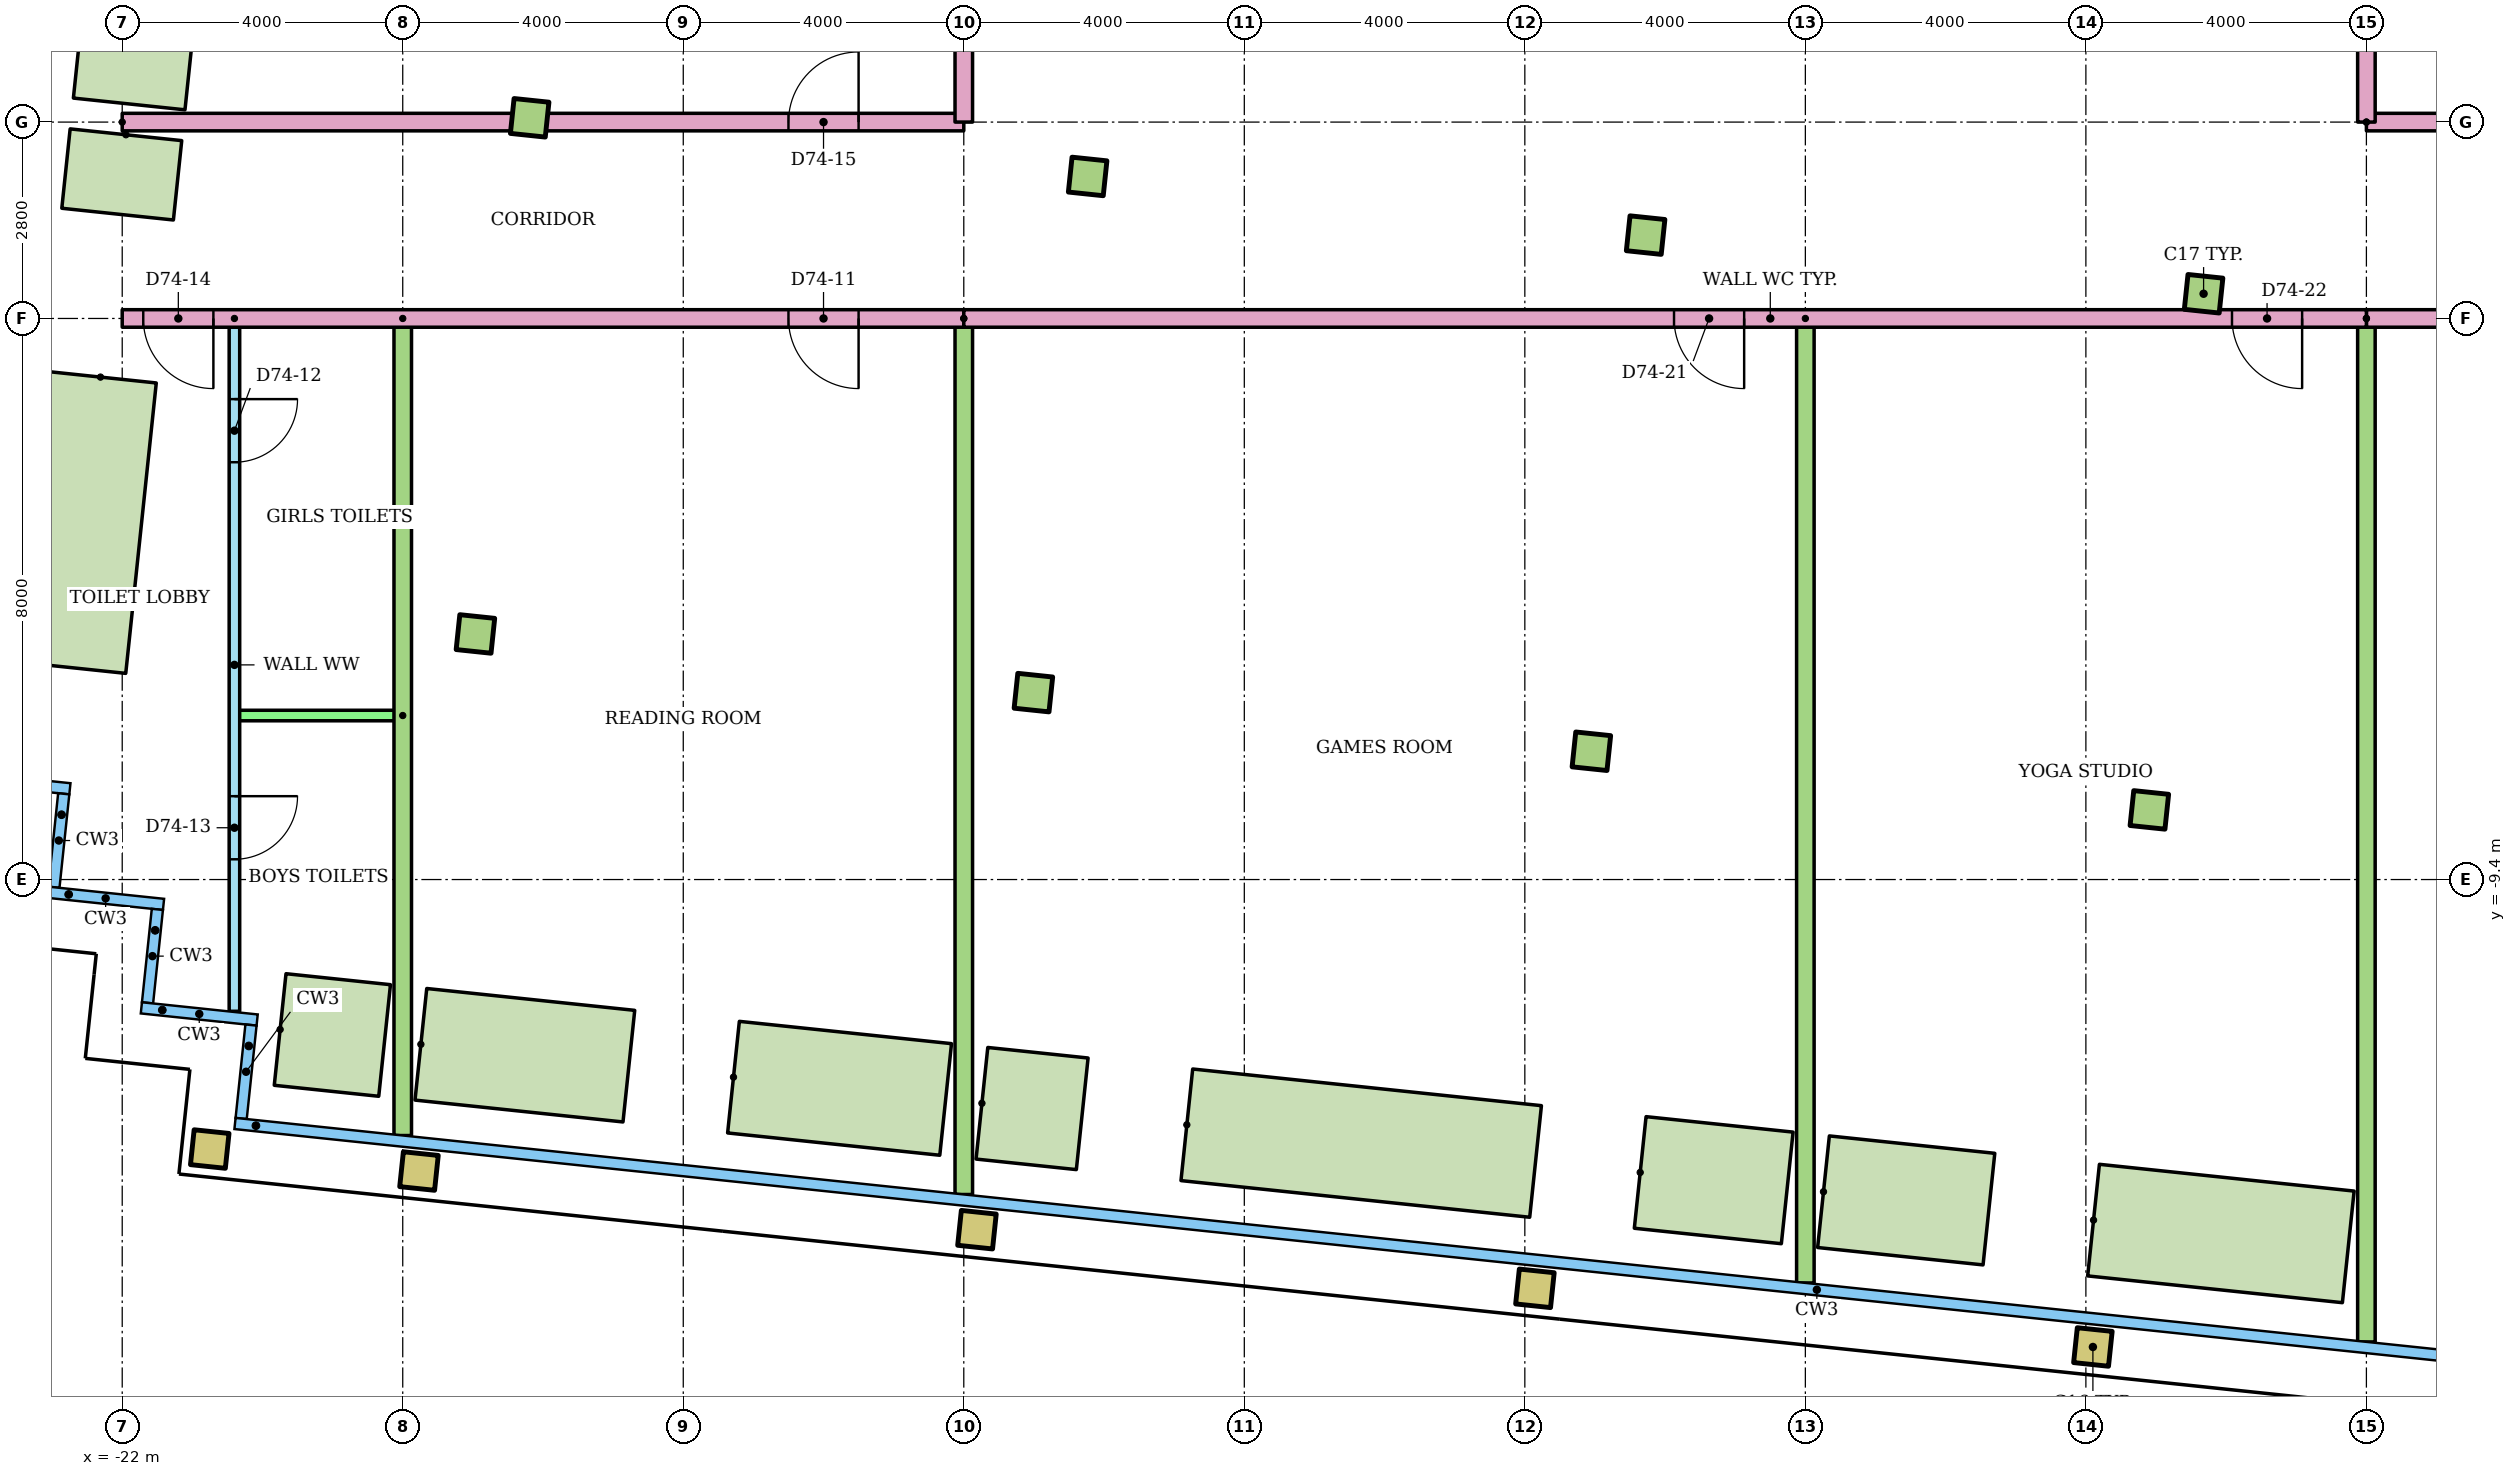
"""IFC4 building model, lengths in metres.
Left out: names, types, materials, properties, quantities, classifications, styles, units other than length and angle.
Written with IfcOpenShell. Run it as: python <this file> out.ifc"""

import sys

from ifc_helpers import new_model, si_unit, direction, frame, frame_2d, origin, origin_2d, place, context, subcontext, project, spatial, rectangle, hollow_rectangle, extrude, element, fill, save


model = new_model("IFC4")
c1 = context("Model", 3, precision=1e-05, world=origin(), true_north=direction((0.0, 1.0)))
c2 = subcontext(c1, "Body", "Model", "MODEL_VIEW")
j1 = project(units=[si_unit("LENGTHUNIT", "METRE"), si_unit("PLANEANGLEUNIT", "RADIAN")], contexts=[c1])
p1 = place(None, origin())
s1 = spatial("IfcSite", under=j1, at=p1, CompositionType="ELEMENT")
p2 = place(p1, origin())
s2 = spatial("IfcBuilding", under=s1, at=p2, CompositionType="ELEMENT")
p3 = place(p2, frame((0.0, 0.0, 281.9)))
s3 = spatial("IfcBuildingStorey", under=s2, at=p3, CompositionType="ELEMENT", Elevation=281.9)
for number, where, z_axis, x_axis in (
    (1, (-20.752, -13.243, 0.0), (0.0, 0.0, 1.0), (0.995, -0.105, 0.0)),
    (2, (-17.768, -13.556, 0.0), (0.0, 0.0, 1.0), (0.995, -0.105, 0.0)),
    (3, (-9.812, -14.392, 0.0), (0.0, 0.0, 1.0), (0.995, -0.105, 0.0)),
    (4, (-1.856, -15.229, 0.0), (0.0, 0.0, 1.0), (0.995, -0.105, 0.0)),
    (5, (6.1, -16.065, 0.0), (0.0, 0.0, 1.0), (0.995, -0.105, 0.0)),
):
    element("IfcColumn", number, at=place(p3, frame(where, z_axis=z_axis, x_axis=x_axis)), inside=s3, PredefinedType="COLUMN", context=c2, shape_type="SweptSolid", body=[
        extrude(hollow_rectangle(XDim=0.5, YDim=0.5, WallThickness=0.025, at=origin_2d()), origin(), (0.0, 0.0, 1.0), 9.6),
    ])
for number, where, z_axis, x_axis in (
    (6, (-16.964, -5.898, 0.0), (0.0, 0.0, 1.0), (0.995, -0.105, 0.0)),
    (7, (-9.007, -6.735, 0.0), (0.0, 0.0, 1.0), (0.995, -0.105, 0.0)),
    (8, (-1.051, -7.571, 0.0), (0.0, 0.0, 1.0), (0.995, -0.105, 0.0)),
    (9, (6.905, -8.407, 0.0), (0.0, 0.0, 1.0), (0.995, -0.105, 0.0)),
    (10, (-16.19, 1.461, 0.0), (0.0, 0.0, 1.0), (0.995, -0.105, 0.0)),
    (11, (-8.234, 0.625, 0.0), (0.0, 0.0, 1.0), (0.995, -0.105, 0.0)),
    (12, (-0.278, -0.211, 0.0), (0.0, 0.0, 1.0), (0.995, -0.105, 0.0)),
    (13, (7.678, -1.048, 0.0), (0.0, 0.0, 1.0), (0.995, -0.105, 0.0)),
):
    element("IfcColumn", number, at=place(p3, frame(where, z_axis=z_axis, x_axis=x_axis)), inside=s3, PredefinedType="COLUMN", context=c2, shape_type="SweptSolid", body=[
        extrude(rectangle(XDim=0.5, YDim=0.5, at=origin_2d()), origin(), (0.0, 0.0, 1.0), 9.6),
    ])
p4 = place(p3, frame((-6.82, -12.897, 0.0), z_axis=(0.0, 0.0, 1.0), x_axis=(0.994520692635, -0.104539905878, 0.0)))
e14 = element("IfcWall", 14, at=p4, inside=s3, PredefinedType="STANDARD", context=c2, shape_type="SweptSolid", body=[
    extrude(rectangle(XDim=5.0, YDim=1.6, at=frame_2d((2.5, 0.0))), origin(), (0.0, 0.0, 1.0), 0.8),
])
p5 = place(p3, frame((-10.0, -1.4, 0.0), z_axis=(0.0, 0.0, 1.0), x_axis=(-1.0, 0.0, 0.0)))
e15 = element("IfcWall", 15, at=p5, inside=s3, PredefinedType="PARTITIONING", context=c2, shape_type="SweptSolid", body=[
    extrude(rectangle(XDim=12.0, YDim=0.25, at=frame_2d((6.0, 0.0))), origin(), (0.0, 0.0, 1.0), 8.8),
])
p6 = place(p5, frame((1.5, 0.0, 0.0)))
e16 = element("IfcOpeningElement", 16, at=p6, cuts=e15, PredefinedType="OPENING", context=c2, shape_type="SweptSolid", body=[
    extrude(rectangle(XDim=1.0, YDim=2.1, at=frame_2d((0.5, 1.05))), frame((0.0, 0.135, 0.0), z_axis=(0.0, -1.0, 0.0), x_axis=(1.0, 0.0, 0.0)), (0.0, 0.0, 1.0), 0.27),
])
p7 = place(p5, frame((10.7, 0.0, 0.0)))
e17 = element("IfcOpeningElement", 17, at=p7, cuts=e15, PredefinedType="OPENING", context=c2, shape_type="SweptSolid", body=[
    extrude(rectangle(XDim=1.0, YDim=2.1, at=frame_2d((0.5, 1.05))), frame((0.0, 0.135, 0.0), z_axis=(0.0, -1.0, 0.0), x_axis=(1.0, 0.0, 0.0)), (0.0, 0.0, 1.0), 0.27),
])
p8 = place(p3, frame((-20.4, -1.4, 0.0), z_axis=(0.0, 0.0, 1.0), x_axis=(0.0, -1.0, 0.0)))
e18 = element("IfcWall", 18, at=p8, inside=s3, PredefinedType="PARTITIONING", context=c2, shape_type="SweptSolid", body=[
    extrude(rectangle(XDim=9.879, YDim=0.15, at=frame_2d((4.939, 0.0))), origin(), (0.0, 0.0, 1.0), 8.8),
])
p9 = place(p8, frame((1.15, 0.0, 0.0)))
e19 = element("IfcOpeningElement", 19, at=p9, cuts=e18, PredefinedType="OPENING", context=c2, shape_type="SweptSolid", body=[
    extrude(rectangle(XDim=0.9, YDim=2.1, at=frame_2d((0.45, 1.05))), frame((0.0, 0.085, 0.0), z_axis=(0.0, -1.0, 0.0), x_axis=(1.0, 0.0, 0.0)), (0.0, 0.0, 1.0), 0.17),
])
p10 = place(p8, frame((6.811, 0.0, 0.0)))
e20 = element("IfcOpeningElement", 20, at=p10, cuts=e18, PredefinedType="OPENING", context=c2, shape_type="SweptSolid", body=[
    extrude(rectangle(XDim=0.9, YDim=2.1, at=frame_2d((0.45, 1.05))), frame((0.0, 0.085, 0.0), z_axis=(0.0, -1.0, 0.0), x_axis=(1.0, 0.0, 0.0)), (0.0, 0.0, 1.0), 0.17),
])
p11 = place(p3, frame((-18.0, -7.061, 0.0), z_axis=(0.0, 0.0, 1.0), x_axis=(-1.0, 0.0, 0.0)))
e21 = element("IfcWall", 21, at=p11, inside=s3, PredefinedType="PARTITIONING", context=c2, shape_type="SweptSolid", body=[
    extrude(rectangle(XDim=2.4, YDim=0.15, at=frame_2d((1.2, 0.0))), origin(), (0.0, 0.0, 1.0), 8.8),
])
p12 = place(p3, frame((-18.0, -1.4, 0.0), z_axis=(0.0, 0.0, 1.0), x_axis=(0.0, -1.0, 0.0)))
e22 = element("IfcWall", 22, at=p12, inside=s3, PredefinedType="PARTITIONING", context=c2, shape_type="SweptSolid", body=[
    extrude(rectangle(XDim=11.65, YDim=0.25, at=frame_2d((5.825, 0.0))), origin(), (0.0, 0.0, 1.0), 8.8),
])
p13 = place(p3, frame((-10.0, -1.4, 0.0), z_axis=(0.0, 0.0, 1.0), x_axis=(0.0, -1.0, 0.0)))
e23 = element("IfcWall", 23, at=p13, inside=s3, PredefinedType="PARTITIONING", context=c2, shape_type="SweptSolid", body=[
    extrude(rectangle(XDim=12.491, YDim=0.25, at=frame_2d((6.246, 0.0))), origin(), (0.0, 0.0, 1.0), 8.8),
])
p14 = place(p3, frame((-22.0, 1.4, 0.0)))
e24 = element("IfcWall", 24, at=p14, inside=s3, PredefinedType="PARTITIONING", context=c2, shape_type="SweptSolid", body=[
    extrude(rectangle(XDim=12.0, YDim=0.25, at=frame_2d((6.0, 0.0))), origin(), (0.0, 0.0, 1.0), 8.8),
])
p15 = place(p14, frame((9.5, 0.0, 0.0)))
e25 = element("IfcOpeningElement", 25, at=p15, cuts=e24, PredefinedType="OPENING", context=c2, shape_type="SweptSolid", body=[
    extrude(rectangle(XDim=1.0, YDim=2.1, at=frame_2d((0.5, 1.05))), frame((0.0, 0.135, 0.0), z_axis=(0.0, -1.0, 0.0), x_axis=(1.0, 0.0, 0.0)), (0.0, 0.0, 1.0), 0.27),
])
p16 = place(p3, frame((25.0, -1.4, 0.0), z_axis=(0.0, 0.0, 1.0), x_axis=(-1.0, 0.0, 0.0)))
e26 = element("IfcWall", 26, at=p16, inside=s3, PredefinedType="PARTITIONING", context=c2, shape_type="SweptSolid", body=[
    extrude(rectangle(XDim=15.0, YDim=0.25, at=frame_2d((7.5, 0.0))), origin(), (0.0, 0.0, 1.0), 8.8),
])
p17 = place(p16, frame((12.5, 0.0, 0.0)))
e27 = element("IfcOpeningElement", 27, at=p17, cuts=e26, PredefinedType="OPENING", context=c2, shape_type="SweptSolid", body=[
    extrude(rectangle(XDim=1.0, YDim=2.1, at=frame_2d((0.5, 1.05))), frame((0.0, 0.135, 0.0), z_axis=(0.0, -1.0, 0.0), x_axis=(1.0, 0.0, 0.0)), (0.0, 0.0, 1.0), 0.27),
])
p18 = place(p16, frame((0.217, 0.0, 0.0)))
e28 = element("IfcOpeningElement", 28, at=p18, cuts=e26, PredefinedType="OPENING", context=c2, shape_type="SweptSolid", body=[
    extrude(rectangle(XDim=0.9, YDim=2.1, at=frame_2d((0.45, 1.05))), frame((0.0, 0.135, 0.0), z_axis=(0.0, -1.0, 0.0), x_axis=(1.0, 0.0, 0.0)), (0.0, 0.0, 1.0), 0.27),
])
p19 = place(p3, frame((10.0, -1.4, 0.0), z_axis=(0.0, 0.0, 1.0), x_axis=(0.0, -1.0, 0.0)))
e29 = element("IfcWall", 29, at=p19, inside=s3, PredefinedType="PARTITIONING", context=c2, shape_type="SweptSolid", body=[
    extrude(rectangle(XDim=14.593, YDim=0.25, at=frame_2d((7.297, 0.0))), origin(), (0.0, 0.0, 1.0), 8.8),
])
p20 = place(p3, frame((10.0, 1.4, 0.0)))
e30 = element("IfcWall", 30, at=p20, inside=s3, PredefinedType="PARTITIONING", context=c2, shape_type="SweptSolid", body=[
    extrude(rectangle(XDim=15.0, YDim=0.25, at=frame_2d((7.5, 0.0))), origin(), (0.0, 0.0, 1.0), 8.8),
])
p21 = place(p20, frame((1.5, 0.0, 0.0)))
e31 = element("IfcOpeningElement", 31, at=p21, cuts=e30, PredefinedType="OPENING", context=c2, shape_type="SweptSolid", body=[
    extrude(rectangle(XDim=1.0, YDim=2.1, at=frame_2d((0.5, 1.05))), frame((0.0, 0.135, 0.0), z_axis=(0.0, -1.0, 0.0), x_axis=(1.0, 0.0, 0.0)), (0.0, 0.0, 1.0), 0.27),
])
p22 = place(p20, frame((12.604, 0.0, 0.0)))
e32 = element("IfcOpeningElement", 32, at=p22, cuts=e30, PredefinedType="OPENING", context=c2, shape_type="SweptSolid", body=[
    extrude(rectangle(XDim=1.0, YDim=2.1, at=frame_2d((0.5, 1.05))), frame((0.0, 0.135, 0.0), z_axis=(0.0, -1.0, 0.0), x_axis=(1.0, 0.0, 0.0)), (0.0, 0.0, 1.0), 0.27),
])
p23 = place(p3, frame((2.0, -1.4, 0.0), z_axis=(0.0, 0.0, 1.0), x_axis=(0.0, -1.0, 0.0)))
e33 = element("IfcWall", 33, at=p23, inside=s3, PredefinedType="PARTITIONING", context=c2, shape_type="SweptSolid", body=[
    extrude(rectangle(XDim=13.752, YDim=0.25, at=frame_2d((6.876, 0.0))), origin(), (0.0, 0.0, 1.0), 8.8),
])
p24 = place(p3, frame((10.0, -1.4, 0.0), z_axis=(0.0, 0.0, 1.0), x_axis=(-1.0, 0.0, 0.0)))
e34 = element("IfcWall", 34, at=p24, inside=s3, PredefinedType="PARTITIONING", context=c2, shape_type="SweptSolid", body=[
    extrude(rectangle(XDim=20.0, YDim=0.25, at=frame_2d((10.0, 0.0))), origin(), (0.0, 0.0, 1.0), 8.8),
])
p25 = place(p24, frame((8.873, 0.0, 0.0)))
e35 = element("IfcOpeningElement", 35, at=p25, cuts=e34, PredefinedType="OPENING", context=c2, shape_type="SweptSolid", body=[
    extrude(rectangle(XDim=1.0, YDim=2.1, at=frame_2d((0.5, 1.05))), frame((0.0, 0.135, 0.0), z_axis=(0.0, -1.0, 0.0), x_axis=(1.0, 0.0, 0.0)), (0.0, 0.0, 1.0), 0.27),
])
p26 = place(p24, frame((0.917, 0.0, 0.0)))
e36 = element("IfcOpeningElement", 36, at=p26, cuts=e34, PredefinedType="OPENING", context=c2, shape_type="SweptSolid", body=[
    extrude(rectangle(XDim=1.0, YDim=2.1, at=frame_2d((0.5, 1.05))), frame((0.0, 0.135, 0.0), z_axis=(0.0, -1.0, 0.0), x_axis=(1.0, 0.0, 0.0)), (0.0, 0.0, 1.0), 0.27),
])
for number, where, z_axis, x_axis in (
    (37, (-10.0, 3.0, 0.0), (0.0, 0.0, 1.0), (0.0, -1.0, 0.0)),
    (38, (10.0, 1.4, 0.0), (0.0, 0.0, 1.0), (0.0, 1.0, 0.0)),
):
    element("IfcWall", number, at=place(p3, frame(where, z_axis=z_axis, x_axis=x_axis)), inside=s3, PredefinedType="PARTITIONING", context=c2, shape_type="SweptSolid", body=[
        extrude(rectangle(XDim=1.6, YDim=0.25, at=frame_2d((0.8, 0.0))), origin(), (0.0, 0.0, 1.0), 8.8),
    ])
p27 = place(p3, frame((-21.543, 5.06, 0.0), z_axis=(0.0, 0.0, 1.0), x_axis=(-0.104499001474, -0.994524991486, 0.0)))
e39 = element("IfcWall", 39, at=p27, inside=s3, PredefinedType="STANDARD", context=c2, shape_type="SweptSolid", body=[
    extrude(rectangle(XDim=3.42, YDim=1.6, at=frame_2d((1.71, 0.0))), origin(), (0.0, 0.0, 1.0), 0.8),
])
p28 = place(p3, frame((-21.947, 1.219, 0.0), z_axis=(0.0, 0.0, 1.0), x_axis=(-0.104472610257, -0.994527764171, 0.0)))
e40 = element("IfcWall", 40, at=p28, inside=s3, PredefinedType="STANDARD", context=c2, shape_type="SweptSolid", body=[
    extrude(rectangle(XDim=1.138, YDim=1.6, at=frame_2d((0.569, 0.0))), origin(), (0.0, 0.0, 1.0), 0.8),
])
p29 = place(p3, frame((-22.31, -2.236, 0.0), z_axis=(0.0, 0.0, 1.0), x_axis=(-0.104547431429, -0.994519901551, 0.0)))
e41 = element("IfcWall", 41, at=p29, inside=s3, PredefinedType="STANDARD", context=c2, shape_type="SweptSolid", body=[
    extrude(rectangle(XDim=4.164, YDim=1.6, at=frame_2d((2.082, 0.0))), origin(), (0.0, 0.0, 1.0), 0.8),
])
p30 = place(p3, frame((-19.748, -11.538, 0.0), z_axis=(0.0, 0.0, 1.0), x_axis=(0.994527756865, -0.104472679802, 0.0)))
e42 = element("IfcWall", 42, at=p30, inside=s3, PredefinedType="STANDARD", context=c2, shape_type="SweptSolid", body=[
    extrude(rectangle(XDim=1.498, YDim=1.6, at=frame_2d((0.749, 0.0))), origin(), (0.0, 0.0, 1.0), 0.8),
])
p31 = place(p3, frame((-17.741, -11.749, 0.0), z_axis=(0.0, 0.0, 1.0), x_axis=(0.994520246325, -0.104544151676, 0.0)))
e43 = element("IfcWall", 43, at=p31, inside=s3, PredefinedType="STANDARD", context=c2, shape_type="SweptSolid", body=[
    extrude(rectangle(XDim=2.982, YDim=1.6, at=frame_2d((1.491, 0.0))), origin(), (0.0, 0.0, 1.0), 0.8),
])
p32 = place(p3, frame((-13.284, -12.218, 0.0), z_axis=(0.0, 0.0, 1.0), x_axis=(0.994525663128, -0.104492609215, 0.0)))
e44 = element("IfcWall", 44, at=p32, inside=s3, PredefinedType="STANDARD", context=c2, shape_type="SweptSolid", body=[
    extrude(rectangle(XDim=3.042, YDim=1.6, at=frame_2d((1.521, 0.0))), origin(), (0.0, 0.0, 1.0), 0.8),
])
p33 = place(p3, frame((-9.741, -12.59, 0.0), z_axis=(0.0, 0.0, 1.0), x_axis=(0.99451661027, -0.104578735392, 0.0)))
e45 = element("IfcWall", 45, at=p33, inside=s3, PredefinedType="STANDARD", context=c2, shape_type="SweptSolid", body=[
    extrude(rectangle(XDim=1.438, YDim=1.6, at=frame_2d((0.719, 0.0))), origin(), (0.0, 0.0, 1.0), 0.8),
])
p34 = place(p3, frame((-0.355, -13.576, 0.0), z_axis=(0.0, 0.0, 1.0), x_axis=(0.994516236026, -0.104582294297, 0.0)))
e46 = element("IfcWall", 46, at=p34, inside=s3, PredefinedType="STANDARD", context=c2, shape_type="SweptSolid", body=[
    extrude(rectangle(XDim=2.108, YDim=1.6, at=frame_2d((1.054, 0.0))), origin(), (0.0, 0.0, 1.0), 0.8),
])
p35 = place(p3, frame((2.259, -13.851, 0.0), z_axis=(0.0, 0.0, 1.0), x_axis=(0.994516727228, -0.104577623149, 0.0)))
e47 = element("IfcWall", 47, at=p35, inside=s3, PredefinedType="STANDARD", context=c2, shape_type="SweptSolid", body=[
    extrude(rectangle(XDim=2.372, YDim=1.6, at=frame_2d((1.186, 0.0))), origin(), (0.0, 0.0, 1.0), 0.8),
])
p36 = place(p3, frame((6.109, -14.256, 0.0), z_axis=(0.0, 0.0, 1.0), x_axis=(0.994519363469, -0.104552549873, 0.0)))
e48 = element("IfcWall", 48, at=p36, inside=s3, PredefinedType="STANDARD", context=c2, shape_type="SweptSolid", body=[
    extrude(rectangle(XDim=3.652, YDim=1.6, at=frame_2d((1.826, 0.0))), origin(), (0.0, 0.0, 1.0), 0.8),
])
p37 = place(p6, origin())
e49 = element("IfcDoor", 49, at=p37, inside=s3, OperationType="SINGLE_SWING_LEFT", PredefinedType="DOOR", context=c2, shape_type="SweptSolid", body=[
    extrude(rectangle(XDim=1.0, YDim=2.1, at=frame_2d((0.5, 1.05))), frame((0.0, 0.025, 0.0), z_axis=(0.0, -1.0, 0.0), x_axis=(1.0, 0.0, 0.0)), (0.0, 0.0, 1.0), 0.05),
])
fill(e16, e49)
p38 = place(p9, origin())
e50 = element("IfcDoor", 50, at=p38, inside=s3, OperationType="SINGLE_SWING_LEFT", PredefinedType="DOOR", context=c2, shape_type="SweptSolid", body=[
    extrude(rectangle(XDim=0.9, YDim=2.1, at=frame_2d((0.45, 1.05))), frame((0.0, 0.025, 0.0), z_axis=(0.0, -1.0, 0.0), x_axis=(1.0, 0.0, 0.0)), (0.0, 0.0, 1.0), 0.05),
])
fill(e19, e50)
p39 = place(p10, origin())
e51 = element("IfcDoor", 51, at=p39, inside=s3, OperationType="SINGLE_SWING_LEFT", PredefinedType="DOOR", context=c2, shape_type="SweptSolid", body=[
    extrude(rectangle(XDim=0.9, YDim=2.1, at=frame_2d((0.45, 1.05))), frame((0.0, 0.025, 0.0), z_axis=(0.0, -1.0, 0.0), x_axis=(1.0, 0.0, 0.0)), (0.0, 0.0, 1.0), 0.05),
])
fill(e20, e51)
p40 = place(p7, origin())
e52 = element("IfcDoor", 52, at=p40, inside=s3, OperationType="SINGLE_SWING_LEFT", PredefinedType="DOOR", context=c2, shape_type="SweptSolid", body=[
    extrude(rectangle(XDim=1.0, YDim=2.1, at=frame_2d((0.5, 1.05))), frame((0.0, 0.025, 0.0), z_axis=(0.0, -1.0, 0.0), x_axis=(1.0, 0.0, 0.0)), (0.0, 0.0, 1.0), 0.05),
])
fill(e17, e52)
p41 = place(p15, origin())
e53 = element("IfcDoor", 53, at=p41, inside=s3, OperationType="SINGLE_SWING_RIGHT", PredefinedType="DOOR", context=c2, shape_type="SweptSolid", body=[
    extrude(rectangle(XDim=1.0, YDim=2.1, at=frame_2d((0.5, 1.05))), frame((0.0, 0.025, 0.0), z_axis=(0.0, -1.0, 0.0), x_axis=(1.0, 0.0, 0.0)), (0.0, 0.0, 1.0), 0.05),
])
fill(e25, e53)
p42 = place(p25, origin())
e54 = element("IfcDoor", 54, at=p42, inside=s3, OperationType="SINGLE_SWING_LEFT", PredefinedType="DOOR", context=c2, shape_type="SweptSolid", body=[
    extrude(rectangle(XDim=1.0, YDim=2.1, at=frame_2d((0.5, 1.05))), frame((0.0, 0.025, 0.0), z_axis=(0.0, -1.0, 0.0), x_axis=(1.0, 0.0, 0.0)), (0.0, 0.0, 1.0), 0.05),
])
fill(e35, e54)
p43 = place(p26, origin())
e55 = element("IfcDoor", 55, at=p43, inside=s3, OperationType="SINGLE_SWING_LEFT", PredefinedType="DOOR", context=c2, shape_type="SweptSolid", body=[
    extrude(rectangle(XDim=1.0, YDim=2.1, at=frame_2d((0.5, 1.05))), frame((0.0, 0.025, 0.0), z_axis=(0.0, -1.0, 0.0), x_axis=(1.0, 0.0, 0.0)), (0.0, 0.0, 1.0), 0.05),
])
fill(e36, e55)
save(model, sys.argv[1])
